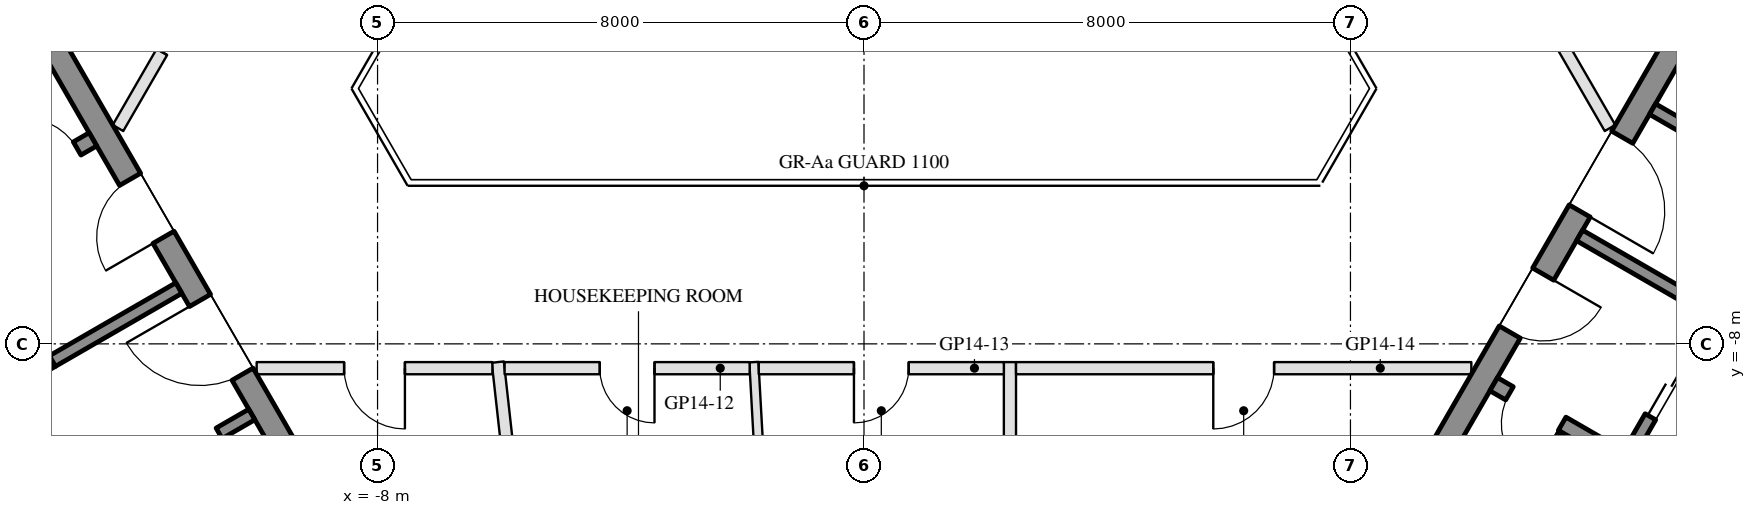
"""IFC4 building model, lengths in metres.
Left out: names, types, materials, properties, quantities, classifications, styles, units other than length and angle.
Written with IfcOpenShell. Run it as: python <this file> out.ifc"""

import sys

from ifc_helpers import new_model, si_unit, direction, frame, frame_2d, origin, place, context, subcontext, project, spatial, rectangle, extrude, element, fill, save


model = new_model("IFC4")
c1 = context("Model", 3, precision=1e-05, world=origin(), true_north=direction((0.0, 1.0)))
c2 = subcontext(c1, "Body", "Model", "MODEL_VIEW")
j1 = project(units=[si_unit("LENGTHUNIT", "METRE"), si_unit("PLANEANGLEUNIT", "RADIAN")], contexts=[c1])
p1 = place(None, origin())
s1 = spatial("IfcSite", under=j1, at=p1, CompositionType="ELEMENT")
p2 = place(p1, origin())
s2 = spatial("IfcBuilding", under=s1, at=p2, CompositionType="ELEMENT")
p3 = place(p2, frame((0.0, 0.0, 165.1)))
s3 = spatial("IfcBuildingStorey", under=s2, at=p3, CompositionType="ELEMENT", Elevation=165.1)
p4 = place(p3, frame((-13.845, -2.22, 0.0), z_axis=(0.0, 0.0, 1.0), x_axis=(0.500004234368, -0.866022959057, 0.0)))
e1 = element("IfcWall", 1, at=p4, inside=s3, PredefinedType="SHEAR", context=c2, shape_type="SweptSolid", body=[
    extrude(rectangle(XDim=10.0, YDim=0.4, at=frame_2d((5.0, 0.0))), origin(), (0.0, 0.0, 1.0), 3.5),
])
p5 = place(p4, frame((3.55, 0.0, 0.0)))
e2 = element("IfcOpeningElement", 2, at=p5, cuts=e1, PredefinedType="OPENING", context=c2, shape_type="SweptSolid", body=[
    extrude(rectangle(XDim=1.1, YDim=2.1, at=frame_2d((0.55, 1.05))), frame((0.0, 0.21, 0.0), z_axis=(0.0, -1.0, 0.0), x_axis=(1.0, 0.0, 0.0)), (0.0, 0.0, 1.0), 0.42),
])
p6 = place(p4, frame((5.85, 0.0, 0.0)))
e3 = element("IfcOpeningElement", 3, at=p6, cuts=e1, PredefinedType="OPENING", context=c2, shape_type="SweptSolid", body=[
    extrude(rectangle(XDim=1.4, YDim=2.1, at=frame_2d((0.7, 1.05))), frame((0.0, 0.21, 0.0), z_axis=(0.0, -1.0, 0.0), x_axis=(1.0, 0.0, 0.0)), (0.0, 0.0, 1.0), 0.42),
])
p7 = place(p3, frame((-12.681, -4.636, 0.0), z_axis=(0.0, 0.0, 1.0), x_axis=(-0.866021702275, -0.500006411147, 0.0)))
e4 = element("IfcWall", 4, at=p7, inside=s3, PredefinedType="SHEAR", context=c2, shape_type="SweptSolid", body=[
    extrude(rectangle(XDim=6.45, YDim=0.25, at=frame_2d((3.225, 0.0))), origin(), (0.0, 0.0, 1.0), 3.5),
])
p8 = place(p7, frame((0.3, 0.0, 0.0)))
e5 = element("IfcOpeningElement", 5, at=p8, cuts=e4, PredefinedType="OPENING", context=c2, shape_type="SweptSolid", body=[
    extrude(rectangle(XDim=1.0, YDim=2.1, at=frame_2d((0.5, 1.05))), frame((0.0, 0.135, 0.0), z_axis=(0.0, -1.0, 0.0), x_axis=(1.0, 0.0, 0.0)), (0.0, 0.0, 1.0), 0.27),
])
p9 = place(p3, frame((-14.783, -5.995, 0.0), z_axis=(0.0, 0.0, 1.0), x_axis=(0.49994636267, -0.866056369097, 0.0)))
e6 = element("IfcWall", 6, at=p9, inside=s3, PredefinedType="SHEAR", context=c2, shape_type="SweptSolid", body=[
    extrude(rectangle(XDim=2.8, YDim=0.2, at=frame_2d((1.4, 0.0))), origin(), (0.0, 0.0, 1.0), 3.5),
])
p10 = place(p9, frame((0.7, 0.0, 0.0)))
e7 = element("IfcOpeningElement", 7, at=p10, cuts=e6, PredefinedType="OPENING", context=c2, shape_type="SweptSolid", body=[
    extrude(rectangle(XDim=1.2, YDim=2.1, at=frame_2d((0.6, 1.05))), frame((0.0, 0.11, 0.0), z_axis=(0.0, -1.0, 0.0), x_axis=(1.0, 0.0, 0.0)), (0.0, 0.0, 1.0), 0.22),
])
p11 = place(p3, frame((-11.268, -7.083, 0.0), z_axis=(0.0, 0.0, 1.0), x_axis=(-0.866050077142, -0.499957262057, 0.0)))
e8 = element("IfcWall", 8, at=p11, inside=s3, PredefinedType="SHEAR", context=c2, shape_type="SweptSolid", body=[
    extrude(rectangle(XDim=2.4, YDim=0.2, at=frame_2d((1.2, 0.0))), origin(), (0.0, 0.0, 1.0), 3.5),
])
p12 = place(p3, frame((-10.068, -9.162, 0.0), z_axis=(0.0, 0.0, 1.0), x_axis=(-0.866032725843, -0.499987317609, 0.0)))
e9 = element("IfcWall", 9, at=p12, inside=s3, PredefinedType="SHEAR", context=c2, shape_type="SweptSolid", body=[
    extrude(rectangle(XDim=10.16, YDim=0.2, at=frame_2d((5.08, 0.0))), origin(), (0.0, 0.0, 1.0), 3.5),
])
p13 = place(p12, frame((0.62, 0.0, 0.0)))
e10 = element("IfcOpeningElement", 10, at=p13, cuts=e9, PredefinedType="OPENING", context=c2, shape_type="SweptSolid", body=[
    extrude(rectangle(XDim=1.1, YDim=2.1, at=frame_2d((0.55, 1.05))), frame((0.0, 0.11, 0.0), z_axis=(0.0, -1.0, 0.0), x_axis=(1.0, 0.0, 0.0)), (0.0, 0.0, 1.0), 0.22),
])
p14 = place(p12, frame((3.16, 0.0, 0.0)))
e11 = element("IfcOpeningElement", 11, at=p14, cuts=e9, PredefinedType="OPENING", context=c2, shape_type="SweptSolid", body=[
    extrude(rectangle(XDim=1.1, YDim=2.1, at=frame_2d((0.55, 1.05))), frame((0.0, 0.11, 0.0), z_axis=(0.0, -1.0, 0.0), x_axis=(1.0, 0.0, 0.0)), (0.0, 0.0, 1.0), 0.22),
])
p15 = place(p12, frame((5.7, 0.0, 0.0)))
e12 = element("IfcOpeningElement", 12, at=p15, cuts=e9, PredefinedType="OPENING", context=c2, shape_type="SweptSolid", body=[
    extrude(rectangle(XDim=1.1, YDim=2.1, at=frame_2d((0.55, 1.05))), frame((0.0, 0.11, 0.0), z_axis=(0.0, -1.0, 0.0), x_axis=(1.0, 0.0, 0.0)), (0.0, 0.0, 1.0), 0.22),
])
p16 = place(p12, frame((8.24, 0.0, 0.0)))
e13 = element("IfcOpeningElement", 13, at=p16, cuts=e9, PredefinedType="OPENING", context=c2, shape_type="SweptSolid", body=[
    extrude(rectangle(XDim=1.1, YDim=2.1, at=frame_2d((0.55, 1.05))), frame((0.0, 0.11, 0.0), z_axis=(0.0, -1.0, 0.0), x_axis=(1.0, 0.0, 0.0)), (0.0, 0.0, 1.0), 0.22),
])
p17 = place(p3, frame((8.845, -10.88, 0.0), z_axis=(0.0, 0.0, 1.0), x_axis=(0.500004234368, 0.866022959057, 0.0)))
e14 = element("IfcWall", 14, at=p17, inside=s3, PredefinedType="SHEAR", context=c2, shape_type="SweptSolid", body=[
    extrude(rectangle(XDim=10.0, YDim=0.4, at=frame_2d((5.0, 0.0))), origin(), (0.0, 0.0, 1.0), 3.5),
])
p18 = place(p17, frame((3.55, 0.0, 0.0)))
e15 = element("IfcOpeningElement", 15, at=p18, cuts=e14, PredefinedType="OPENING", context=c2, shape_type="SweptSolid", body=[
    extrude(rectangle(XDim=1.1, YDim=2.1, at=frame_2d((0.55, 1.05))), frame((0.0, 0.21, 0.0), z_axis=(0.0, -1.0, 0.0), x_axis=(1.0, 0.0, 0.0)), (0.0, 0.0, 1.0), 0.42),
])
p19 = place(p17, frame((5.85, 0.0, 0.0)))
e16 = element("IfcOpeningElement", 16, at=p19, cuts=e14, PredefinedType="OPENING", context=c2, shape_type="SweptSolid", body=[
    extrude(rectangle(XDim=1.4, YDim=2.1, at=frame_2d((0.7, 1.05))), frame((0.0, 0.21, 0.0), z_axis=(0.0, -1.0, 0.0), x_axis=(1.0, 0.0, 0.0)), (0.0, 0.0, 1.0), 0.42),
])
p20 = place(p3, frame((10.356, -8.664, 0.0), z_axis=(0.0, 0.0, 1.0), x_axis=(0.866028629588, -0.499994412703, 0.0)))
e17 = element("IfcWall", 17, at=p20, inside=s3, PredefinedType="SHEAR", context=c2, shape_type="SweptSolid", body=[
    extrude(rectangle(XDim=6.45, YDim=0.25, at=frame_2d((3.225, 0.0))), origin(), (0.0, 0.0, 1.0), 3.5),
])
p21 = place(p20, frame((0.3, 0.0, 0.0)))
e18 = element("IfcOpeningElement", 18, at=p21, cuts=e17, PredefinedType="OPENING", context=c2, shape_type="SweptSolid", body=[
    extrude(rectangle(XDim=1.0, YDim=2.1, at=frame_2d((0.5, 1.05))), frame((0.0, 0.135, 0.0), z_axis=(0.0, -1.0, 0.0), x_axis=(1.0, 0.0, 0.0)), (0.0, 0.0, 1.0), 0.27),
])
p22 = place(p3, frame((12.583, -9.805, 0.0), z_axis=(0.0, 0.0, 1.0), x_axis=(0.49994636267, 0.866056369097, 0.0)))
e19 = element("IfcWall", 19, at=p22, inside=s3, PredefinedType="SHEAR", context=c2, shape_type="SweptSolid", body=[
    extrude(rectangle(XDim=2.8, YDim=0.2, at=frame_2d((1.4, 0.0))), origin(), (0.0, 0.0, 1.0), 3.5),
])
p23 = place(p22, frame((0.7, 0.0, 0.0)))
e20 = element("IfcOpeningElement", 20, at=p23, cuts=e19, PredefinedType="OPENING", context=c2, shape_type="SweptSolid", body=[
    extrude(rectangle(XDim=1.2, YDim=2.1, at=frame_2d((0.6, 1.05))), frame((0.0, 0.11, 0.0), z_axis=(0.0, -1.0, 0.0), x_axis=(1.0, 0.0, 0.0)), (0.0, 0.0, 1.0), 0.22),
])
p24 = place(p3, frame((11.768, -6.217, 0.0), z_axis=(0.0, 0.0, 1.0), x_axis=(0.866050077142, -0.499957262057, 0.0)))
e21 = element("IfcWall", 21, at=p24, inside=s3, PredefinedType="SHEAR", context=c2, shape_type="SweptSolid", body=[
    extrude(rectangle(XDim=2.4, YDim=0.2, at=frame_2d((1.2, 0.0))), origin(), (0.0, 0.0, 1.0), 3.5),
])
p25 = place(p3, frame((12.968, -4.138, 0.0), z_axis=(0.0, 0.0, 1.0), x_axis=(0.866028328073, -0.49999493495, 0.0)))
e22 = element("IfcWall", 22, at=p25, inside=s3, PredefinedType="SHEAR", context=c2, shape_type="SweptSolid", body=[
    extrude(rectangle(XDim=10.16, YDim=0.2, at=frame_2d((5.08, 0.0))), origin(), (0.0, 0.0, 1.0), 3.5),
])
p26 = place(p25, frame((1.99, 0.0, 0.0)))
e23 = element("IfcOpeningElement", 23, at=p26, cuts=e22, PredefinedType="OPENING", context=c2, shape_type="SweptSolid", body=[
    extrude(rectangle(XDim=0.9, YDim=2.1, at=frame_2d((0.45, 1.05))), frame((0.0, 0.11, 0.0), z_axis=(0.0, -1.0, 0.0), x_axis=(1.0, 0.0, 0.0)), (0.0, 0.0, 1.0), 0.22),
])
p27 = place(p25, frame((7.07, 0.0, 0.0)))
e24 = element("IfcOpeningElement", 24, at=p27, cuts=e22, PredefinedType="OPENING", context=c2, shape_type="SweptSolid", body=[
    extrude(rectangle(XDim=0.9, YDim=2.1, at=frame_2d((0.45, 1.05))), frame((0.0, 0.11, 0.0), z_axis=(0.0, -1.0, 0.0), x_axis=(1.0, 0.0, 0.0)), (0.0, 0.0, 1.0), 0.22),
])
p28 = place(p3, frame((-4.9, -18.38, 0.0), z_axis=(0.0, 0.0, 1.0), x_axis=(-0.110634961609, 0.993861109648, 0.0)))
e25 = element("IfcWall", 25, at=p28, inside=s3, PredefinedType="PARTITIONING", context=c2, shape_type="SweptSolid", body=[
    extrude(rectangle(XDim=10.142, YDim=0.2, at=frame_2d((5.071, 0.0))), origin(), (0.0, 0.0, 1.0), 3.06),
])
p29 = place(p3, frame((2.4, -19.28, 0.0), z_axis=(0.0, 0.0, 1.0), x_axis=(0.0, 1.0, 0.0)))
e26 = element("IfcWall", 26, at=p29, inside=s3, PredefinedType="PARTITIONING", context=c2, shape_type="SweptSolid", body=[
    extrude(rectangle(XDim=10.98, YDim=0.2, at=frame_2d((5.49, 0.0))), origin(), (0.0, 0.0, 1.0), 3.06),
])
p30 = place(p3, frame((-6.112, -8.4, 0.0), z_axis=(0.0, 0.0, 1.0), x_axis=(-1.0, 0.0, 0.0)))
e27 = element("IfcWall", 27, at=p30, inside=s3, PredefinedType="PARTITIONING", context=c2, shape_type="SweptSolid", body=[
    extrude(rectangle(XDim=3.876, YDim=0.2, at=frame_2d((1.938, 0.0))), origin(), (0.0, 0.0, 1.0), 2.95),
])
p31 = place(p30, frame((1.438, 0.0, 0.0)))
e28 = element("IfcOpeningElement", 28, at=p31, cuts=e27, PredefinedType="OPENING", context=c2, shape_type="SweptSolid", body=[
    extrude(rectangle(XDim=1.0, YDim=2.1, at=frame_2d((0.5, 1.05))), frame((0.0, 0.11, 0.0), z_axis=(0.0, -1.0, 0.0), x_axis=(1.0, 0.0, 0.0)), (0.0, 0.0, 1.0), 0.22),
])
p32 = place(p3, frame((-1.25, -18.38, 0.0), z_axis=(0.0, 0.0, 1.0), x_axis=(-0.055573151667, 0.998454618305, 0.0)))
e29 = element("IfcWall", 29, at=p32, inside=s3, PredefinedType="PARTITIONING", context=c2, shape_type="SweptSolid", body=[
    extrude(rectangle(XDim=10.095, YDim=0.15, at=frame_2d((5.048, 0.0))), origin(), (0.0, 0.0, 1.0), 3.06),
])
p33 = place(p3, frame((-1.881, -8.4, 0.0), z_axis=(0.0, 0.0, 1.0), x_axis=(-1.0, 0.0, 0.0)))
e30 = element("IfcWall", 30, at=p33, inside=s3, PredefinedType="PARTITIONING", context=c2, shape_type="SweptSolid", body=[
    extrude(rectangle(XDim=4.03, YDim=0.2, at=frame_2d((2.015, 0.0))), origin(), (0.0, 0.0, 1.0), 2.95),
])
p34 = place(p33, frame((1.565, 0.0, 0.0)))
e31 = element("IfcOpeningElement", 31, at=p34, cuts=e30, PredefinedType="OPENING", context=c2, shape_type="SweptSolid", body=[
    extrude(rectangle(XDim=0.9, YDim=2.1, at=frame_2d((0.45, 1.05))), frame((0.0, 0.11, 0.0), z_axis=(0.0, -1.0, 0.0), x_axis=(1.0, 0.0, 0.0)), (0.0, 0.0, 1.0), 0.22),
])
p35 = place(p3, frame((2.3, -8.4, 0.0), z_axis=(0.0, 0.0, 1.0), x_axis=(-1.0, 0.0, 0.0)))
e32 = element("IfcWall", 32, at=p35, inside=s3, PredefinedType="PARTITIONING", context=c2, shape_type="SweptSolid", body=[
    extrude(rectangle(XDim=4.031, YDim=0.2, at=frame_2d((2.015, 0.0))), origin(), (0.0, 0.0, 1.0), 2.95),
])
p36 = place(p35, frame((1.565, 0.0, 0.0)))
e33 = element("IfcOpeningElement", 33, at=p36, cuts=e32, PredefinedType="OPENING", context=c2, shape_type="SweptSolid", body=[
    extrude(rectangle(XDim=0.9, YDim=2.1, at=frame_2d((0.45, 1.05))), frame((0.0, 0.11, 0.0), z_axis=(0.0, -1.0, 0.0), x_axis=(1.0, 0.0, 0.0)), (0.0, 0.0, 1.0), 0.22),
])
p37 = place(p3, frame((9.988, -8.4, 0.0), z_axis=(0.0, 0.0, 1.0), x_axis=(-1.0, 0.0, 0.0)))
e34 = element("IfcWall", 34, at=p37, inside=s3, PredefinedType="PARTITIONING", context=c2, shape_type="SweptSolid", body=[
    extrude(rectangle(XDim=7.488, YDim=0.2, at=frame_2d((3.744, 0.0))), origin(), (0.0, 0.0, 1.0), 2.95),
])
p38 = place(p37, frame((3.244, 0.0, 0.0)))
e35 = element("IfcOpeningElement", 35, at=p38, cuts=e34, PredefinedType="OPENING", context=c2, shape_type="SweptSolid", body=[
    extrude(rectangle(XDim=1.0, YDim=2.1, at=frame_2d((0.5, 1.05))), frame((0.0, 0.11, 0.0), z_axis=(0.0, -1.0, 0.0), x_axis=(1.0, 0.0, 0.0)), (0.0, 0.0, 1.0), 0.22),
])
p39 = place(p3, frame((9.729, -0.051, 0.0), z_axis=(0.0, 0.0, 1.0), x_axis=(0.500005339912, -0.866022320763, 0.0)))
e36 = element("IfcWall", 36, at=p39, inside=s3, PredefinedType="PARTITIONING", context=c2, shape_type="SweptSolid", body=[
    extrude(rectangle(XDim=5.08, YDim=0.2, at=frame_2d((2.54, 0.0))), origin(), (0.0, 0.0, 1.0), 2.95),
])
p40 = place(p39, frame((2.04, 0.0, 0.0)))
e37 = element("IfcOpeningElement", 37, at=p40, cuts=e36, PredefinedType="OPENING", context=c2, shape_type="SweptSolid", body=[
    extrude(rectangle(XDim=1.0, YDim=2.1, at=frame_2d((0.5, 1.05))), frame((0.0, 0.11, 0.0), z_axis=(0.0, -1.0, 0.0), x_axis=(1.0, 0.0, 0.0)), (0.0, 0.0, 1.0), 0.22),
])
p41 = place(p3, frame((-12.269, -4.45, 0.0), z_axis=(0.0, 0.0, 1.0), x_axis=(0.500008716408, 0.866020371305, 0.0)))
e38 = element("IfcWall", 38, at=p41, inside=s3, PredefinedType="PARTITIONING", context=c2, shape_type="SweptSolid", body=[
    extrude(rectangle(XDim=3.888, YDim=0.2, at=frame_2d((1.944, 0.0))), origin(), (0.0, 0.0, 1.0), 2.95),
])
p42 = place(p41, frame((1.444, 0.0, 0.0)))
e39 = element("IfcOpeningElement", 39, at=p42, cuts=e38, PredefinedType="OPENING", context=c2, shape_type="SweptSolid", body=[
    extrude(rectangle(XDim=1.0, YDim=2.1, at=frame_2d((0.5, 1.05))), frame((0.0, 0.11, 0.0), z_axis=(0.0, -1.0, 0.0), x_axis=(1.0, 0.0, 0.0)), (0.0, 0.0, 1.0), 0.22),
])
p43 = place(p13, origin())
e40 = element("IfcDoor", 40, at=p43, inside=s3, OperationType="DOUBLE_DOOR_SLIDING", PredefinedType="DOOR", context=c2, shape_type="SweptSolid", body=[
    extrude(rectangle(XDim=1.1, YDim=2.1, at=frame_2d((0.55, 1.05))), frame((0.0, 0.025, 0.0), z_axis=(0.0, -1.0, 0.0), x_axis=(1.0, 0.0, 0.0)), (0.0, 0.0, 1.0), 0.05),
])
fill(e10, e40)
p44 = place(p5, frame((1.1, 0.0, 0.0), z_axis=(0.0, 0.0, 1.0), x_axis=(-1.0, 0.0, 0.0)))
e41 = element("IfcDoor", 41, at=p44, inside=s3, OperationType="SINGLE_SWING_LEFT", PredefinedType="DOOR", context=c2, shape_type="SweptSolid", body=[
    extrude(rectangle(XDim=1.1, YDim=2.1, at=frame_2d((0.55, 1.05))), frame((0.0, 0.025, 0.0), z_axis=(0.0, -1.0, 0.0), x_axis=(1.0, 0.0, 0.0)), (0.0, 0.0, 1.0), 0.05),
])
fill(e2, e41)
p45 = place(p6, frame((1.4, 0.0, 0.0), z_axis=(0.0, 0.0, 1.0), x_axis=(-1.0, 0.0, 0.0)))
e42 = element("IfcDoor", 42, at=p45, inside=s3, OperationType="DOUBLE_DOOR_SINGLE_SWING", PredefinedType="DOOR", context=c2, shape_type="SweptSolid", body=[
    extrude(rectangle(XDim=1.4, YDim=2.1, at=frame_2d((0.7, 1.05))), frame((0.0, 0.025, 0.0), z_axis=(0.0, -1.0, 0.0), x_axis=(1.0, 0.0, 0.0)), (0.0, 0.0, 1.0), 0.05),
])
fill(e3, e42)
p46 = place(p8, frame((1.0, 0.0, 0.0), z_axis=(0.0, 0.0, 1.0), x_axis=(-1.0, 0.0, 0.0)))
e43 = element("IfcDoor", 43, at=p46, inside=s3, OperationType="SINGLE_SWING_LEFT", PredefinedType="DOOR", context=c2, shape_type="SweptSolid", body=[
    extrude(rectangle(XDim=1.0, YDim=2.1, at=frame_2d((0.5, 1.05))), frame((0.0, 0.025, 0.0), z_axis=(0.0, -1.0, 0.0), x_axis=(1.0, 0.0, 0.0)), (0.0, 0.0, 1.0), 0.05),
])
fill(e5, e43)
p47 = place(p23, origin())
e44 = element("IfcDoor", 44, at=p47, inside=s3, OperationType="DOUBLE_DOOR_SLIDING", PredefinedType="DOOR", context=c2, shape_type="SweptSolid", body=[
    extrude(rectangle(XDim=1.2, YDim=2.1, at=frame_2d((0.6, 1.05))), frame((0.0, 0.025, 0.0), z_axis=(0.0, -1.0, 0.0), x_axis=(1.0, 0.0, 0.0)), (0.0, 0.0, 1.0), 0.05),
])
fill(e20, e44)
p48 = place(p18, frame((1.1, 0.0, 0.0), z_axis=(0.0, 0.0, 1.0), x_axis=(-1.0, 0.0, 0.0)))
e45 = element("IfcDoor", 45, at=p48, inside=s3, OperationType="SINGLE_SWING_LEFT", PredefinedType="DOOR", context=c2, shape_type="SweptSolid", body=[
    extrude(rectangle(XDim=1.1, YDim=2.1, at=frame_2d((0.55, 1.05))), frame((0.0, 0.025, 0.0), z_axis=(0.0, -1.0, 0.0), x_axis=(1.0, 0.0, 0.0)), (0.0, 0.0, 1.0), 0.05),
])
fill(e15, e45)
p49 = place(p19, frame((1.4, 0.0, 0.0), z_axis=(0.0, 0.0, 1.0), x_axis=(-1.0, 0.0, 0.0)))
e46 = element("IfcDoor", 46, at=p49, inside=s3, OperationType="DOUBLE_DOOR_SINGLE_SWING", PredefinedType="DOOR", context=c2, shape_type="SweptSolid", body=[
    extrude(rectangle(XDim=1.4, YDim=2.1, at=frame_2d((0.7, 1.05))), frame((0.0, 0.025, 0.0), z_axis=(0.0, -1.0, 0.0), x_axis=(1.0, 0.0, 0.0)), (0.0, 0.0, 1.0), 0.05),
])
fill(e16, e46)
p50 = place(p21, frame((1.0, 0.0, 0.0), z_axis=(0.0, 0.0, 1.0), x_axis=(-1.0, 0.0, 0.0)))
e47 = element("IfcDoor", 47, at=p50, inside=s3, OperationType="SINGLE_SWING_LEFT", PredefinedType="DOOR", context=c2, shape_type="SweptSolid", body=[
    extrude(rectangle(XDim=1.0, YDim=2.1, at=frame_2d((0.5, 1.05))), frame((0.0, 0.025, 0.0), z_axis=(0.0, -1.0, 0.0), x_axis=(1.0, 0.0, 0.0)), (0.0, 0.0, 1.0), 0.05),
])
fill(e18, e47)
p51 = place(p31, origin())
e48 = element("IfcDoor", 48, at=p51, inside=s3, OperationType="SINGLE_SWING_LEFT", PredefinedType="DOOR", context=c2, shape_type="SweptSolid", body=[
    extrude(rectangle(XDim=1.0, YDim=2.1, at=frame_2d((0.5, 1.05))), frame((0.0, 0.025, 0.0), z_axis=(0.0, -1.0, 0.0), x_axis=(1.0, 0.0, 0.0)), (0.0, 0.0, 1.0), 0.05),
])
fill(e28, e48)
p52 = place(p34, origin())
e49 = element("IfcDoor", 49, at=p52, inside=s3, OperationType="SINGLE_SWING_LEFT", PredefinedType="DOOR", context=c2, shape_type="SweptSolid", body=[
    extrude(rectangle(XDim=0.9, YDim=2.1, at=frame_2d((0.45, 1.05))), frame((0.0, 0.025, 0.0), z_axis=(0.0, -1.0, 0.0), x_axis=(1.0, 0.0, 0.0)), (0.0, 0.0, 1.0), 0.05),
])
fill(e31, e49)
p53 = place(p36, origin())
e50 = element("IfcDoor", 50, at=p53, inside=s3, OperationType="SINGLE_SWING_RIGHT", PredefinedType="DOOR", context=c2, shape_type="SweptSolid", body=[
    extrude(rectangle(XDim=0.9, YDim=2.1, at=frame_2d((0.45, 1.05))), frame((0.0, 0.025, 0.0), z_axis=(0.0, -1.0, 0.0), x_axis=(1.0, 0.0, 0.0)), (0.0, 0.0, 1.0), 0.05),
])
fill(e33, e50)
p54 = place(p38, origin())
e51 = element("IfcDoor", 51, at=p54, inside=s3, OperationType="SINGLE_SWING_RIGHT", PredefinedType="DOOR", context=c2, shape_type="SweptSolid", body=[
    extrude(rectangle(XDim=1.0, YDim=2.1, at=frame_2d((0.5, 1.05))), frame((0.0, 0.025, 0.0), z_axis=(0.0, -1.0, 0.0), x_axis=(1.0, 0.0, 0.0)), (0.0, 0.0, 1.0), 0.05),
])
fill(e35, e51)
p55 = place(p42, origin())
e52 = element("IfcDoor", 52, at=p55, inside=s3, OperationType="SINGLE_SWING_RIGHT", PredefinedType="DOOR", context=c2, shape_type="SweptSolid", body=[
    extrude(rectangle(XDim=1.0, YDim=2.1, at=frame_2d((0.5, 1.05))), frame((0.0, 0.025, 0.0), z_axis=(0.0, -1.0, 0.0), x_axis=(1.0, 0.0, 0.0)), (0.0, 0.0, 1.0), 0.05),
])
fill(e39, e52)
save(model, sys.argv[1])
